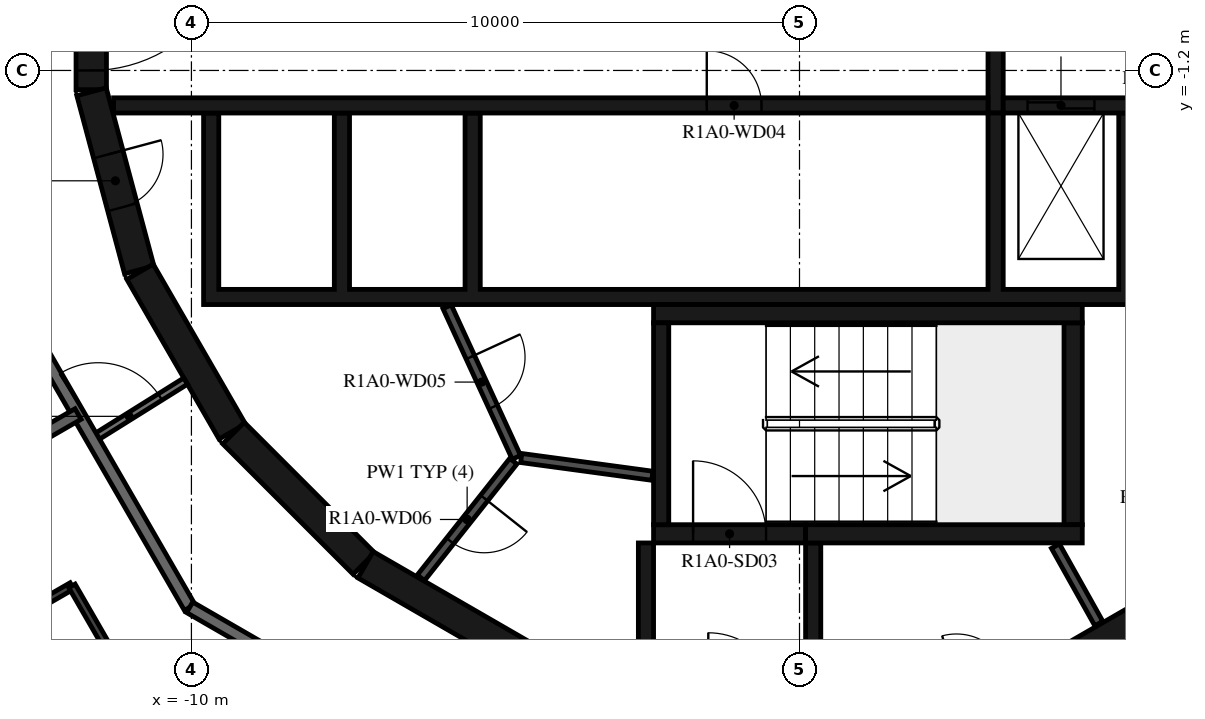
"""IFC4 building model, lengths in metres.
Left out: names, types, materials, properties, quantities, classifications, styles, units other than length and angle.
Written with IfcOpenShell. Run it as: python <this file> out.ifc"""

import sys

from ifc_helpers import new_model, si_unit, direction, frame, frame_2d, origin, place, context, subcontext, project, spatial, polyline, rectangle, outline, extrude, element, fill, save


model = new_model("IFC4")
c1 = context("Model", 3, precision=1e-05, world=origin(), true_north=direction((0.0, 1.0)))
c2 = subcontext(c1, "Body", "Model", "MODEL_VIEW")
j1 = project(units=[si_unit("LENGTHUNIT", "METRE"), si_unit("PLANEANGLEUNIT", "RADIAN")], contexts=[c1])
p1 = place(None, origin())
s1 = spatial("IfcSite", under=j1, at=p1, CompositionType="ELEMENT")
p2 = place(p1, origin())
s2 = spatial("IfcBuilding", under=s1, at=p2, CompositionType="ELEMENT")
p3 = place(p2, frame((0.0, 0.0, 45.4)))
s3 = spatial("IfcBuildingStorey", under=s2, at=p3, CompositionType="ELEMENT", Elevation=45.4)
p4 = place(p3, frame((4.51, -10.845, 0.0), z_axis=(0.0, 0.0, 1.0), x_axis=(0.865975092491, 0.500087131594, 0.0)))
e1 = element("IfcWall", 1, at=p4, inside=s3, PredefinedType="SHEAR", context=c2, shape_type="SweptSolid", body=[
    extrude(rectangle(XDim=3.033, YDim=0.5, at=frame_2d((1.516, 0.0))), origin(), (0.0, 0.0, 1.0), 3.12),
])
p5 = place(p3, frame((-11.647, 1.516, 0.0), z_axis=(0.0, 0.0, 1.0), x_axis=(0.0, -1.0, 0.0)))
e2 = element("IfcWall", 2, at=p5, inside=s3, PredefinedType="SHEAR", context=c2, shape_type="SweptSolid", body=[
    extrude(rectangle(XDim=3.033, YDim=0.5, at=frame_2d((1.516, 0.0))), origin(), (0.0, 0.0, 1.0), 3.12),
])
p6 = place(p5, frame((0.316, 0.0, 0.0)))
e3 = element("IfcOpeningElement", 3, at=p6, cuts=e2, PredefinedType="OPENING", context=c2, shape_type="SweptSolid", body=[
    extrude(rectangle(XDim=2.4, YDim=2.1, at=frame_2d((1.2, 1.05))), frame((0.0, 0.26, 0.0), z_axis=(0.0, -1.0, 0.0), x_axis=(1.0, 0.0, 0.0)), (0.0, 0.0, 1.0), 0.52),
])
p7 = place(p3, frame((-11.643, -1.55, 0.0), z_axis=(0.0, 0.0, 1.0), x_axis=(0.258734743916, -0.965948410781, 0.0)))
e4 = element("IfcWall", 4, at=p7, inside=s3, PredefinedType="SHEAR", context=c2, shape_type="SweptSolid", body=[
    extrude(rectangle(XDim=3.033, YDim=0.5, at=frame_2d((1.516, 0.0))), origin(), (0.0, 0.0, 1.0), 3.12),
])
p8 = place(p7, frame((1.066, 0.0, 0.0)))
e5 = element("IfcOpeningElement", 5, at=p8, cuts=e4, PredefinedType="OPENING", context=c2, shape_type="SweptSolid", body=[
    extrude(rectangle(XDim=0.9, YDim=2.1, at=frame_2d((0.45, 1.05))), frame((0.0, 0.26, 0.0), z_axis=(0.0, -1.0, 0.0), x_axis=(1.0, 0.0, 0.0)), (0.0, 0.0, 1.0), 0.52),
])
p9 = place(p3, frame((-10.845, -4.51, 0.0), z_axis=(0.0, 0.0, 1.0), x_axis=(0.500087131594, -0.865975092491, 0.0)))
e6 = element("IfcWall", 6, at=p9, inside=s3, PredefinedType="SHEAR", context=c2, shape_type="SweptSolid", body=[
    extrude(rectangle(XDim=3.033, YDim=0.5, at=frame_2d((1.516, 0.0))), origin(), (0.0, 0.0, 1.0), 3.12),
])
p10 = place(p3, frame((-9.308, -7.164, 0.0), z_axis=(0.0, 0.0, 1.0), x_axis=(0.707106781187, -0.707106781187, 0.0)))
e7 = element("IfcWall", 7, at=p10, inside=s3, PredefinedType="SHEAR", context=c2, shape_type="SweptSolid", body=[
    extrude(rectangle(XDim=3.032, YDim=0.5, at=frame_2d((1.516, 0.0))), origin(), (0.0, 0.0, 1.0), 3.12),
])
p11 = place(p3, frame((-7.137, -9.329, 0.0), z_axis=(0.0, 0.0, 1.0), x_axis=(0.865975092491, -0.500087131594, 0.0)))
e8 = element("IfcWall", 8, at=p11, inside=s3, PredefinedType="SHEAR", context=c2, shape_type="SweptSolid", body=[
    extrude(rectangle(XDim=3.033, YDim=0.5, at=frame_2d((1.516, 0.0))), origin(), (0.0, 0.0, 1.0), 3.12),
])
p12 = place(p3, frame((-2.275, -8.67, 0.0), z_axis=(0.0, 0.0, 1.0), x_axis=(0.0, 1.0, 0.0)))
e9 = element("IfcWall", 9, at=p12, inside=s3, PredefinedType="SHEAR", context=c2, shape_type="SweptSolid", body=[
    extrude(rectangle(XDim=3.32, YDim=0.25, at=frame_2d((1.66, 0.0))), origin(), (0.0, 0.0, 1.0), 3.12),
])
p13 = place(p3, frame((-2.4, -5.2, 0.0), z_axis=(0.0, 0.0, 1.0), x_axis=(1.0, 0.0, 0.0)))
e10 = element("IfcWall", 10, at=p13, inside=s3, PredefinedType="SHEAR", context=c2, shape_type="SweptSolid", body=[
    extrude(rectangle(XDim=7.05, YDim=0.3, at=frame_2d((3.525, 0.0))), origin(), (0.0, 0.0, 1.0), 3.12),
])
p14 = place(p3, frame((4.5, -8.67, 0.0), z_axis=(0.0, 0.0, 1.0), x_axis=(0.0, 1.0, 0.0)))
e11 = element("IfcWall", 11, at=p14, inside=s3, PredefinedType="SHEAR", context=c2, shape_type="SweptSolid", body=[
    extrude(rectangle(XDim=3.32, YDim=0.3, at=frame_2d((1.66, 0.0))), origin(), (0.0, 0.0, 1.0), 3.12),
])
p15 = place(p3, frame((0.1, -8.82, 0.0), z_axis=(0.0, 0.0, 1.0), x_axis=(1.0, 0.0, 0.0)))
e12 = element("IfcWall", 12, at=p15, inside=s3, PredefinedType="SHEAR", context=c2, shape_type="SweptSolid", body=[
    extrude(rectangle(XDim=4.55, YDim=0.3, at=frame_2d((2.275, 0.0))), origin(), (0.0, 0.0, 1.0), 3.12),
])
p16 = place(p3, frame((-2.4, -8.82, 0.0), z_axis=(0.0, 0.0, 1.0), x_axis=(1.0, 0.0, 0.0)))
e13 = element("IfcWall", 13, at=p16, inside=s3, PredefinedType="SHEAR", context=c2, shape_type="SweptSolid", body=[
    extrude(rectangle(XDim=2.5, YDim=0.3, at=frame_2d((1.25, 0.0))), origin(), (0.0, 0.0, 1.0), 3.12),
])
p17 = place(p16, frame((0.65, 0.0, 0.0)))
e14 = element("IfcOpeningElement", 14, at=p17, cuts=e13, PredefinedType="OPENING", context=c2, shape_type="SweptSolid", body=[
    extrude(rectangle(XDim=1.2, YDim=2.1, at=frame_2d((0.6, 1.05))), frame((0.0, 0.16, 0.0), z_axis=(0.0, -1.0, 0.0), x_axis=(1.0, 0.0, 0.0)), (0.0, 0.0, 1.0), 0.32),
])
p18 = place(p3, frame((-2.525, -8.97, 0.0), z_axis=(0.0, 0.0, 1.0), x_axis=(0.0, -1.0, 0.0)))
e15 = element("IfcWall", 15, at=p18, inside=s3, PredefinedType="SHEAR", context=c2, shape_type="SweptSolid", body=[
    extrude(rectangle(XDim=2.11, YDim=0.25, at=frame_2d((1.055, 0.0))), origin(), (0.0, 0.0, 1.0), 3.12),
])
p19 = place(p3, frame((0.225, -8.97, 0.0), z_axis=(0.0, 0.0, 1.0), x_axis=(0.0, -1.0, 0.0)))
e16 = element("IfcWall", 16, at=p19, inside=s3, PredefinedType="SHEAR", context=c2, shape_type="SweptSolid", body=[
    extrude(rectangle(XDim=2.41, YDim=0.25, at=frame_2d((1.205, 0.0))), origin(), (0.0, 0.0, 1.0), 3.12),
])
p20 = place(p3, origin())
e17 = element("IfcWall", 17, at=p20, inside=s3, PredefinedType="SHEAR", context=c2, shape_type="SweptSolid", body=[
    extrude(outline(polyline([(9.8, -5.05), (9.8, -4.8), (9.8, -1.9), (9.55, -1.9), (9.55, -4.8), (7.65, -4.8), (7.65, -1.9), (7.4, -1.9), (7.4, -4.8), (5.5, -4.8), (5.5, -1.9), (5.25, -1.9), (5.25, -4.8), (3.35, -4.8), (3.35, -1.9), (3.1, -1.9), (3.1, -4.8), (-5.25, -4.8), (-5.25, -1.9), (-5.5, -1.9), (-5.5, -4.8), (-7.4, -4.8), (-7.4, -1.9), (-7.65, -1.9), (-7.65, -4.8), (-9.55, -4.8), (-9.55, -1.9), (-9.8, -1.9), (-9.8, -4.8), (-9.8, -5.05), (9.8, -5.05)])), origin(), (0.0, 0.0, 1.0), 3.12),
])
p21 = place(p3, frame((-11.28, -1.775, 0.0), z_axis=(0.0, 0.0, 1.0), x_axis=(1.0, 0.0, 0.0)))
e18 = element("IfcWall", 18, at=p21, inside=s3, PredefinedType="SHEAR", context=c2, shape_type="SweptSolid", body=[
    extrude(rectangle(XDim=14.38, YDim=0.25, at=frame_2d((7.19, 0.0))), origin(), (0.0, 0.0, 1.0), 3.12),
])
p22 = place(p21, frame((9.755, 0.0, 0.0)))
e19 = element("IfcOpeningElement", 19, at=p22, cuts=e18, PredefinedType="OPENING", context=c2, shape_type="SweptSolid", body=[
    extrude(rectangle(XDim=0.9, YDim=2.1, at=frame_2d((0.45, 1.05))), frame((0.0, 0.135, 0.0), z_axis=(0.0, -1.0, 0.0), x_axis=(1.0, 0.0, 0.0)), (0.0, 0.0, 1.0), 0.27),
])
p23 = place(p3, frame((3.35, -1.775, 0.0), z_axis=(0.0, 0.0, 1.0), x_axis=(1.0, 0.0, 0.0)))
e20 = element("IfcWall", 20, at=p23, inside=s3, PredefinedType="SHEAR", context=c2, shape_type="SweptSolid", body=[
    extrude(rectangle(XDim=7.93, YDim=0.25, at=frame_2d((3.965, 0.0))), origin(), (0.0, 0.0, 1.0), 3.12),
])
p24 = place(p23, frame((0.4, 0.0, 0.0)))
e21 = element("IfcOpeningElement", 21, at=p24, cuts=e20, PredefinedType="OPENING", context=c2, shape_type="SweptSolid", body=[
    extrude(rectangle(XDim=1.1, YDim=2.4, at=frame_2d((0.55, 1.2))), frame((0.0, 0.135, 0.0), z_axis=(0.0, -1.0, 0.0), x_axis=(1.0, 0.0, 0.0)), (0.0, 0.0, 1.0), 0.27),
])
p25 = place(p23, frame((2.55, 0.0, 0.0)))
e22 = element("IfcOpeningElement", 22, at=p25, cuts=e20, PredefinedType="OPENING", context=c2, shape_type="SweptSolid", body=[
    extrude(rectangle(XDim=1.1, YDim=2.4, at=frame_2d((0.55, 1.2))), frame((0.0, 0.135, 0.0), z_axis=(0.0, -1.0, 0.0), x_axis=(1.0, 0.0, 0.0)), (0.0, 0.0, 1.0), 0.27),
])
p26 = place(p23, frame((4.7, 0.0, 0.0)))
e23 = element("IfcOpeningElement", 23, at=p26, cuts=e20, PredefinedType="OPENING", context=c2, shape_type="SweptSolid", body=[
    extrude(rectangle(XDim=1.1, YDim=2.4, at=frame_2d((0.55, 1.2))), frame((0.0, 0.135, 0.0), z_axis=(0.0, -1.0, 0.0), x_axis=(1.0, 0.0, 0.0)), (0.0, 0.0, 1.0), 0.27),
])
p27 = place(p3, frame((3.225, -1.9, 0.0), z_axis=(0.0, 0.0, 1.0), x_axis=(0.0, 1.0, 0.0)))
e24 = element("IfcWall", 24, at=p27, inside=s3, PredefinedType="SHEAR", context=c2, shape_type="SweptSolid", body=[
    extrude(rectangle(XDim=3.8, YDim=0.25, at=frame_2d((1.9, 0.0))), origin(), (0.0, 0.0, 1.0), 3.12),
])
p28 = place(p3, frame((4.922, -10.296, 0.0), z_axis=(0.0, 0.0, 1.0), x_axis=(-0.48860846254, 0.872503163509, 0.0)))
e25 = element("IfcWall", 25, at=p28, inside=s3, PredefinedType="PARTITIONING", context=c2, shape_type="SweptSolid", body=[
    extrude(rectangle(XDim=1.459, YDim=0.15, at=frame_2d((0.73, 0.0))), origin(), (0.0, 0.0, 1.0), 3.12),
])
p29 = place(p3, frame((-5.795, -5.086, 0.0), z_axis=(0.0, 0.0, 1.0), x_axis=(0.417887867606, -0.908498613157, 0.0)))
e26 = element("IfcWall", 26, at=p29, inside=s3, PredefinedType="PARTITIONING", context=c2, shape_type="SweptSolid", body=[
    extrude(rectangle(XDim=2.726, YDim=0.15, at=frame_2d((1.363, 0.0))), origin(), (0.0, 0.0, 1.0), 3.12),
])
p30 = place(p29, frame((0.913, 0.0, 0.0)))
e27 = element("IfcOpeningElement", 27, at=p30, cuts=e26, PredefinedType="OPENING", context=c2, shape_type="SweptSolid", body=[
    extrude(rectangle(XDim=0.9, YDim=2.1, at=frame_2d((0.45, 1.05))), frame((0.0, 0.085, 0.0), z_axis=(0.0, -1.0, 0.0), x_axis=(1.0, 0.0, 0.0)), (0.0, 0.0, 1.0), 0.17),
])
p31 = place(p3, frame((-4.706, -7.625, 0.0), z_axis=(0.0, 0.0, 1.0), x_axis=(-0.621392599334, -0.783499353856, 0.0)))
e28 = element("IfcWall", 28, at=p31, inside=s3, PredefinedType="PARTITIONING", context=c2, shape_type="SweptSolid", body=[
    extrude(rectangle(XDim=2.447, YDim=0.15, at=frame_2d((1.224, 0.0))), origin(), (0.0, 0.0, 1.0), 3.12),
])
p32 = place(p31, frame((0.774, 0.0, 0.0)))
e29 = element("IfcOpeningElement", 29, at=p32, cuts=e28, PredefinedType="OPENING", context=c2, shape_type="SweptSolid", body=[
    extrude(rectangle(XDim=0.9, YDim=2.1, at=frame_2d((0.45, 1.05))), frame((0.0, 0.085, 0.0), z_axis=(0.0, -1.0, 0.0), x_axis=(1.0, 0.0, 0.0)), (0.0, 0.0, 1.0), 0.17),
])
p33 = place(p3, frame((-2.42, -7.865, 0.0), z_axis=(0.0, 0.0, 1.0), x_axis=(-0.990972299108, 0.134066783362, 0.0)))
e30 = element("IfcWall", 30, at=p33, inside=s3, PredefinedType="PARTITIONING", context=c2, shape_type="SweptSolid", body=[
    extrude(rectangle(XDim=2.176, YDim=0.15, at=frame_2d((1.088, 0.0))), origin(), (0.0, 0.0, 1.0), 3.12),
])
p34 = place(p3, frame((-11.625, -7.264, 0.0), z_axis=(0.0, 0.0, 1.0), x_axis=(0.84803632456, 0.529938102259, 0.0)))
e31 = element("IfcWall", 31, at=p34, inside=s3, PredefinedType="PARTITIONING", context=c2, shape_type="SweptSolid", body=[
    extrude(rectangle(XDim=1.804, YDim=0.12, at=frame_2d((0.902, 0.0))), origin(), (0.0, 0.0, 1.0), 3.12),
])
p35 = place(p34, frame((0.11, 0.0, 0.0)))
e32 = element("IfcOpeningElement", 32, at=p35, cuts=e31, PredefinedType="OPENING", context=c2, shape_type="SweptSolid", body=[
    extrude(rectangle(XDim=1.2, YDim=2.1, at=frame_2d((0.6, 1.05))), frame((0.0, 0.07, 0.0), z_axis=(0.0, -1.0, 0.0), x_axis=(1.0, 0.0, 0.0)), (0.0, 0.0, 1.0), 0.14),
])
p36 = place(p3, frame((-13.7, -3.671, 0.0), z_axis=(0.0, 0.0, 1.0), x_axis=(0.500001669485, -0.866024439905, 0.0)))
e33 = element("IfcWall", 33, at=p36, inside=s3, PredefinedType="STANDARD", context=c2, shape_type="SweptSolid", body=[
    extrude(rectangle(XDim=7.342, YDim=0.2, at=frame_2d((3.671, 0.0))), origin(), (0.0, 0.0, 1.0), 3.12),
])
p37 = place(p3, frame((-10.029, -10.029, 0.0), z_axis=(0.0, 0.0, 1.0), x_axis=(0.866022878987, -0.500004373052, 0.0)))
e34 = element("IfcWall", 34, at=p37, inside=s3, PredefinedType="STANDARD", context=c2, shape_type="SweptSolid", body=[
    extrude(rectangle(XDim=7.146, YDim=0.2, at=frame_2d((3.573, 0.0))), origin(), (0.0, 0.0, 1.0), 3.12),
])
p38 = place(p37, frame((5.947, 0.0, 0.0)))
e35 = element("IfcOpeningElement", 35, at=p38, cuts=e34, PredefinedType="OPENING", context=c2, shape_type="SweptSolid", body=[
    extrude(rectangle(XDim=1.0, YDim=2.1, at=frame_2d((0.5, 1.05))), frame((0.0, 0.11, 0.0), z_axis=(0.0, -1.0, 0.0), x_axis=(1.0, 0.0, 0.0)), (0.0, 0.0, 1.0), 0.22),
])
p39 = place(p3, frame((3.671, -13.7, 0.0), z_axis=(0.0, 0.0, 1.0), x_axis=(0.866024439905, 0.500001669485, 0.0)))
e36 = element("IfcWall", 36, at=p39, inside=s3, PredefinedType="STANDARD", context=c2, shape_type="SweptSolid", body=[
    extrude(rectangle(XDim=7.342, YDim=0.2, at=frame_2d((3.671, 0.0))), origin(), (0.0, 0.0, 1.0), 3.12),
])
p40 = place(p3, frame((-18.694, -10.793, 0.0), z_axis=(0.0, 0.0, 1.0), x_axis=(0.86603400694, 0.499985098601, 0.0)))
e37 = element("IfcWall", 37, at=p40, inside=s3, PredefinedType="STANDARD", context=c2, shape_type="SweptSolid", body=[
    extrude(rectangle(XDim=7.885, YDim=0.2, at=frame_2d((3.943, 0.0))), origin(), (0.0, 0.0, 1.0), 3.12),
])
p41 = place(p3, frame((-17.099, -12.641, 0.0), z_axis=(0.0, 0.0, 1.0), x_axis=(0.866027165828, 0.499996948039, 0.0)))
e38 = element("IfcWall", 38, at=p41, inside=s3, PredefinedType="PARTITIONING", context=c2, shape_type="SweptSolid", body=[
    extrude(rectangle(XDim=5.928, YDim=0.12, at=frame_2d((2.964, 0.0))), origin(), (0.0, 0.0, 1.0), 3.12),
])
p42 = place(p41, frame((0.595, 0.0, 0.0)))
e39 = element("IfcOpeningElement", 39, at=p42, cuts=e38, PredefinedType="OPENING", context=c2, shape_type="SweptSolid", body=[
    extrude(rectangle(XDim=0.9, YDim=2.1, at=frame_2d((0.45, 1.05))), frame((0.0, 0.07, 0.0), z_axis=(0.0, -1.0, 0.0), x_axis=(1.0, 0.0, 0.0)), (0.0, 0.0, 1.0), 0.14),
])
p43 = place(p3, frame((-11.965, -9.677, 0.0), z_axis=(0.0, 0.0, 1.0), x_axis=(0.499932737185, -0.866064234506, 0.0)))
e40 = element("IfcWall", 40, at=p43, inside=s3, PredefinedType="PARTITIONING", context=c2, shape_type="SweptSolid", body=[
    extrude(rectangle(XDim=1.675, YDim=0.12, at=frame_2d((0.837, 0.0))), origin(), (0.0, 0.0, 1.0), 3.12),
])
p44 = place(p17, origin())
e41 = element("IfcDoor", 41, at=p44, inside=s3, OperationType="SINGLE_SWING_LEFT", PredefinedType="DOOR", context=c2, shape_type="SweptSolid", body=[
    extrude(rectangle(XDim=1.2, YDim=2.1, at=frame_2d((0.6, 1.05))), frame((0.0, 0.025, 0.0), z_axis=(0.0, -1.0, 0.0), x_axis=(1.0, 0.0, 0.0)), (0.0, 0.0, 1.0), 0.05),
])
fill(e14, e41)
p45 = place(p6, origin())
e42 = element("IfcDoor", 42, at=p45, inside=s3, OperationType="DOUBLE_DOOR_SINGLE_SWING", PredefinedType="DOOR", context=c2, shape_type="SweptSolid", body=[
    extrude(rectangle(XDim=2.4, YDim=2.1, at=frame_2d((1.2, 1.05))), frame((0.0, 0.025, 0.0), z_axis=(0.0, -1.0, 0.0), x_axis=(1.0, 0.0, 0.0)), (0.0, 0.0, 1.0), 0.05),
])
fill(e3, e42)
p46 = place(p24, origin())
e43 = element("IfcDoor", 43, at=p46, inside=s3, OperationType="DOUBLE_DOOR_SLIDING", PredefinedType="DOOR", context=c2, shape_type="SweptSolid", body=[
    extrude(rectangle(XDim=1.1, YDim=2.4, at=frame_2d((0.55, 1.2))), frame((0.0, 0.025, 0.0), z_axis=(0.0, -1.0, 0.0), x_axis=(1.0, 0.0, 0.0)), (0.0, 0.0, 1.0), 0.05),
])
fill(e21, e43)
p47 = place(p22, origin())
e44 = element("IfcDoor", 44, at=p47, inside=s3, OperationType="SINGLE_SWING_LEFT", PredefinedType="DOOR", context=c2, shape_type="SweptSolid", body=[
    extrude(rectangle(XDim=0.9, YDim=2.1, at=frame_2d((0.45, 1.05))), frame((0.0, 0.025, 0.0), z_axis=(0.0, -1.0, 0.0), x_axis=(1.0, 0.0, 0.0)), (0.0, 0.0, 1.0), 0.05),
])
fill(e19, e44)
p48 = place(p30, origin())
e45 = element("IfcDoor", 45, at=p48, inside=s3, OperationType="SINGLE_SWING_RIGHT", PredefinedType="DOOR", context=c2, shape_type="SweptSolid", body=[
    extrude(rectangle(XDim=0.9, YDim=2.1, at=frame_2d((0.45, 1.05))), frame((0.0, 0.025, 0.0), z_axis=(0.0, -1.0, 0.0), x_axis=(1.0, 0.0, 0.0)), (0.0, 0.0, 1.0), 0.05),
])
fill(e27, e45)
p49 = place(p32, origin())
e46 = element("IfcDoor", 46, at=p49, inside=s3, OperationType="SINGLE_SWING_LEFT", PredefinedType="DOOR", context=c2, shape_type="SweptSolid", body=[
    extrude(rectangle(XDim=0.9, YDim=2.1, at=frame_2d((0.45, 1.05))), frame((0.0, 0.025, 0.0), z_axis=(0.0, -1.0, 0.0), x_axis=(1.0, 0.0, 0.0)), (0.0, 0.0, 1.0), 0.05),
])
fill(e29, e46)
p50 = place(p8, origin())
e47 = element("IfcDoor", 47, at=p50, inside=s3, OperationType="SINGLE_SWING_RIGHT", PredefinedType="DOOR", context=c2, shape_type="SweptSolid", body=[
    extrude(rectangle(XDim=0.9, YDim=2.1, at=frame_2d((0.45, 1.05))), frame((0.0, 0.025, 0.0), z_axis=(0.0, -1.0, 0.0), x_axis=(1.0, 0.0, 0.0)), (0.0, 0.0, 1.0), 0.05),
])
fill(e5, e47)
p51 = place(p35, origin())
e48 = element("IfcDoor", 48, at=p51, inside=s3, OperationType="DOUBLE_DOOR_SINGLE_SWING", PredefinedType="DOOR", context=c2, shape_type="SweptSolid", body=[
    extrude(rectangle(XDim=1.2, YDim=2.1, at=frame_2d((0.6, 1.05))), frame((0.0, 0.025, 0.0), z_axis=(0.0, -1.0, 0.0), x_axis=(1.0, 0.0, 0.0)), (0.0, 0.0, 1.0), 0.05),
])
fill(e32, e48)
save(model, sys.argv[1])
